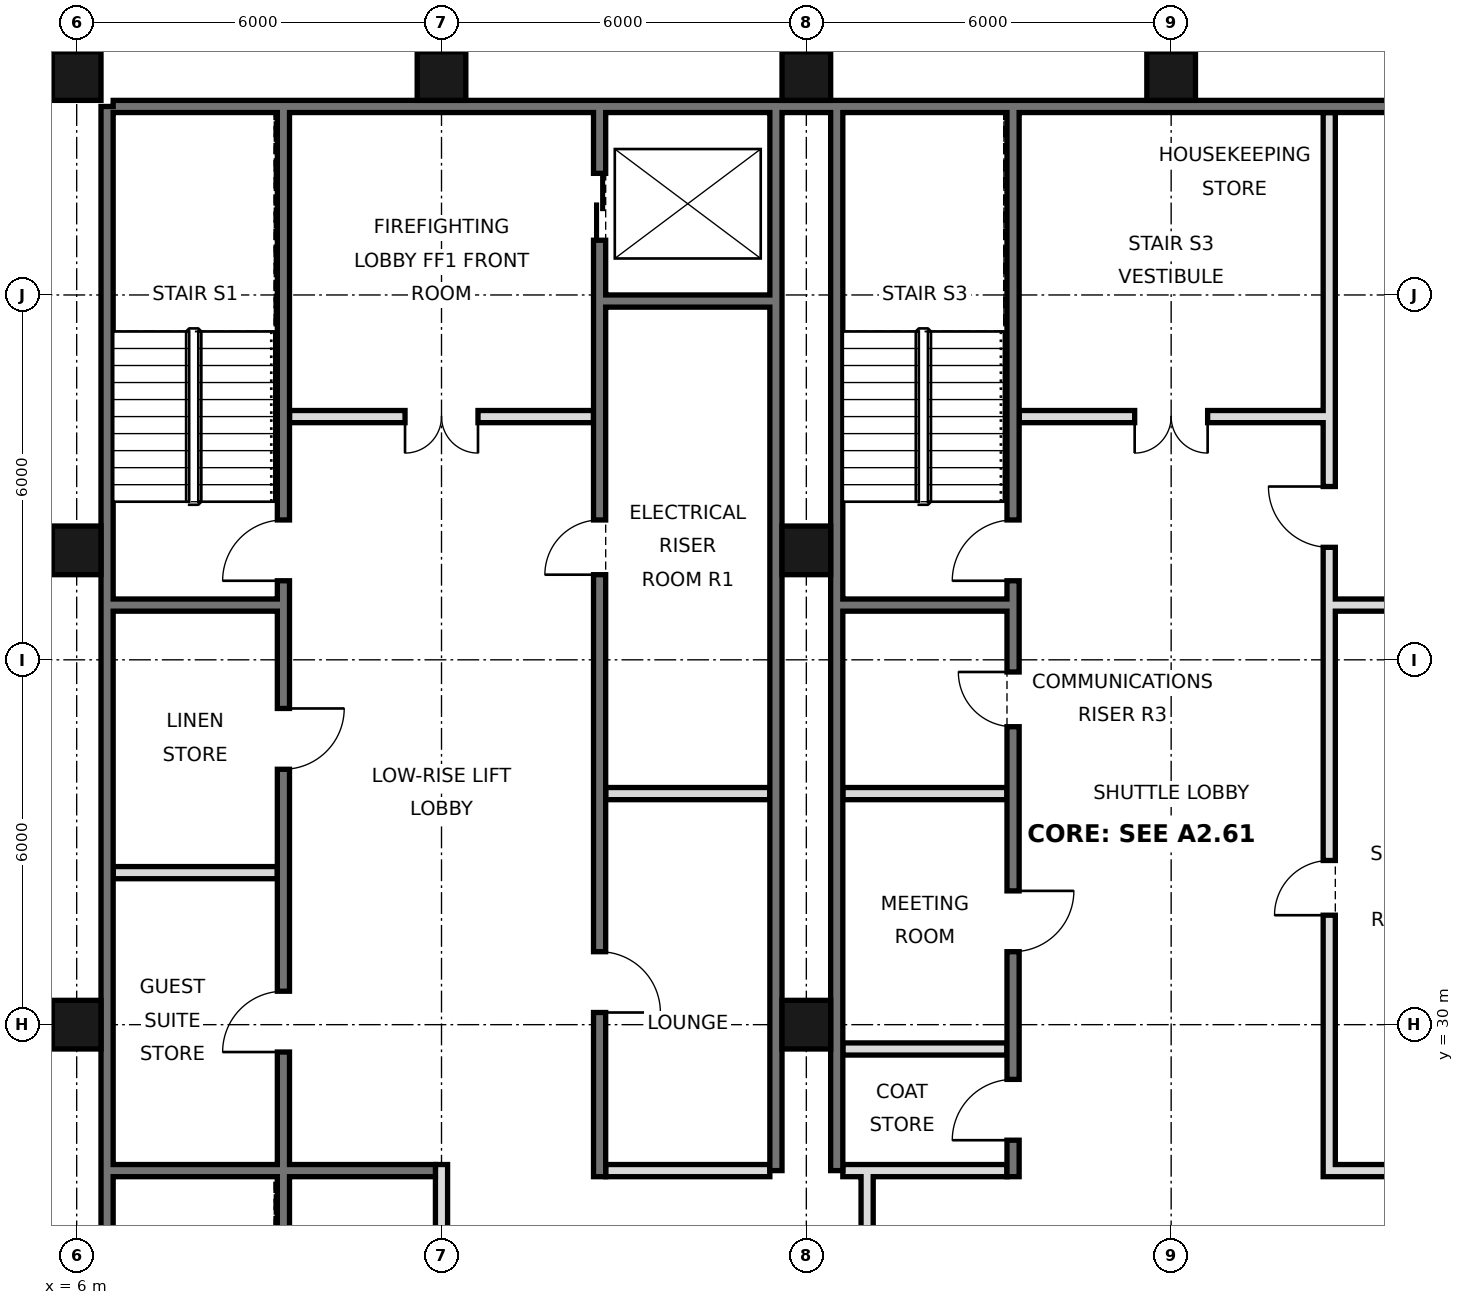
"""IFC4 building model, lengths in metres.
Left out: names, types, materials, properties, quantities, classifications, styles, units other than length and angle.
Written with IfcOpenShell. Run it as: python <this file> out.ifc"""

import sys

from ifc_helpers import new_model, si_unit, direction, frame, frame_2d, origin, origin_2d, place, context, subcontext, project, spatial, rectangle, hollow_rectangle, extrude, element, fill, save


model = new_model("IFC4")
c1 = context("Model", 3, precision=1e-05, world=origin(), true_north=direction((0.0, 1.0)))
c2 = subcontext(c1, "Body", "Model", "MODEL_VIEW")
j1 = project(units=[si_unit("LENGTHUNIT", "METRE"), si_unit("PLANEANGLEUNIT", "RADIAN")], contexts=[c1])
p1 = place(None, origin())
s1 = spatial("IfcSite", under=j1, at=p1, CompositionType="ELEMENT")
p2 = place(p1, origin())
s2 = spatial("IfcBuilding", under=s1, at=p2, CompositionType="ELEMENT")
p3 = place(p2, frame((0.0, 0.0, 243.2)))
s3 = spatial("IfcBuildingStorey", under=s2, at=p3, CompositionType="ELEMENT", Elevation=243.2)
for number, where, z_axis, x_axis in (
    (1, (6.0, 30.0, 0.0), (0.0, 0.0, 1.0), (1.0, 0.0, 0.0)),
    (2, (6.0, 37.8, 0.0), (0.0, 0.0, 1.0), (1.0, 0.0, 0.0)),
    (3, (6.0, 45.6, 0.0), (0.0, 0.0, 1.0), (1.0, 0.0, 0.0)),
    (4, (12.0, 45.6, 0.0), (0.0, 0.0, 1.0), (1.0, 0.0, 0.0)),
    (5, (18.0, 30.0, 0.0), (0.0, 0.0, 1.0), (1.0, 0.0, 0.0)),
    (6, (18.0, 37.8, 0.0), (0.0, 0.0, 1.0), (1.0, 0.0, 0.0)),
    (7, (18.0, 45.6, 0.0), (0.0, 0.0, 1.0), (1.0, 0.0, 0.0)),
    (8, (24.0, 45.6, 0.0), (0.0, 0.0, 1.0), (1.0, 0.0, 0.0)),
):
    element("IfcColumn", number, at=place(p3, frame(where, z_axis=z_axis, x_axis=x_axis)), inside=s3, PredefinedType="COLUMN", context=c2, shape_type="SweptSolid", body=[
        extrude(hollow_rectangle(XDim=0.8, YDim=0.8, WallThickness=0.04, at=origin_2d()), origin(), (0.0, 0.0, 1.0), 3.6),
    ])
p4 = place(p3, frame((6.5, 21.6, 0.0), z_axis=(0.0, 0.0, 1.0), x_axis=(0.0, 1.0, 0.0)))
e9 = element("IfcWall", 9, at=p4, inside=s3, PredefinedType="SOLIDWALL", context=c2, shape_type="SweptSolid", body=[
    extrude(rectangle(XDim=23.5, YDim=0.2, at=frame_2d((11.75, 0.0))), origin(), (0.0, 0.0, 1.0), 3.42),
])
p5 = place(p3, frame((6.6, 45.1, 0.0), z_axis=(0.0, 0.0, 1.0), x_axis=(1.0, 0.0, 0.0)))
e10 = element("IfcWall", 10, at=p5, inside=s3, PredefinedType="SOLIDWALL", context=c2, shape_type="SweptSolid", body=[
    extrude(rectangle(XDim=34.8, YDim=0.2, at=frame_2d((17.4, 0.0))), origin(), (0.0, 0.0, 1.0), 3.42),
])
for number, where, z_axis, x_axis in (
    (11, (17.5, 27.6, 0.0), (0.0, 0.0, 1.0), (0.0, 1.0, 0.0)),
    (12, (18.5, 27.6, 0.0), (0.0, 0.0, 1.0), (0.0, 1.0, 0.0)),
):
    element("IfcWall", number, at=place(p3, frame(where, z_axis=z_axis, x_axis=x_axis)), inside=s3, PredefinedType="SOLIDWALL", context=c2, shape_type="SweptSolid", body=[
        extrude(rectangle(XDim=17.5, YDim=0.2, at=frame_2d((8.75, 0.0))), origin(), (0.0, 0.0, 1.0), 3.42),
    ])
p6 = place(p3, frame((19.0, 21.6, 0.0), z_axis=(0.0, 0.0, 1.0), x_axis=(0.0, 1.0, 0.0)))
e13 = element("IfcWall", 13, at=p6, inside=s3, PredefinedType="PARTITIONING", context=c2, shape_type="SweptSolid", body=[
    extrude(rectangle(XDim=6.0, YDim=0.2, at=frame_2d((3.0, 0.0))), origin(), (0.0, 0.0, 1.0), 3.42),
])
p7 = place(p6, frame((2.1, 0.0, 0.0)))
e14 = element("IfcOpeningElement", 14, at=p7, cuts=e13, PredefinedType="OPENING", context=c2, shape_type="SweptSolid", body=[
    extrude(rectangle(XDim=1.8, YDim=2.1, at=frame_2d((0.9, 1.05))), frame((0.0, 0.11, 0.0), z_axis=(0.0, -1.0, 0.0), x_axis=(1.0, 0.0, 0.0)), (0.0, 0.0, 1.0), 0.22),
])
p8 = place(p3, frame((12.0, 21.6, 0.0), z_axis=(0.0, 0.0, 1.0), x_axis=(0.0, 1.0, 0.0)))
e15 = element("IfcWall", 15, at=p8, inside=s3, PredefinedType="PARTITIONING", context=c2, shape_type="SweptSolid", body=[
    extrude(rectangle(XDim=6.1, YDim=0.2, at=frame_2d((3.05, 0.0))), origin(), (0.0, 0.0, 1.0), 3.42),
])
p9 = place(p3, frame((14.6, 27.5, 0.0), z_axis=(0.0, 0.0, 1.0), x_axis=(0.0, 1.0, 0.0)))
e16 = element("IfcWall", 16, at=p9, inside=s3, PredefinedType="SOLIDWALL", context=c2, shape_type="SweptSolid", body=[
    extrude(rectangle(XDim=17.5, YDim=0.2, at=frame_2d((8.75, 0.0))), origin(), (0.0, 0.0, 1.0), 3.42),
])
p10 = place(p9, frame((15.4, 0.0, 0.0)))
e17 = element("IfcOpeningElement", 17, at=p10, cuts=e16, PredefinedType="OPENING", context=c2, shape_type="SweptSolid", body=[
    extrude(rectangle(XDim=1.1, YDim=2.1, at=frame_2d((0.55, 1.05))), frame((0.0, 0.11, 0.0), z_axis=(0.0, -1.0, 0.0), x_axis=(1.0, 0.0, 0.0)), (0.0, 0.0, 1.0), 0.22),
])
p11 = place(p9, frame((2.7, 0.0, 0.0)))
e18 = element("IfcOpeningElement", 18, at=p11, cuts=e16, PredefinedType="OPENING", context=c2, shape_type="SweptSolid", body=[
    extrude(rectangle(XDim=1.0, YDim=2.1, at=frame_2d((0.5, 1.05))), frame((0.0, 0.11, 0.0), z_axis=(0.0, -1.0, 0.0), x_axis=(1.0, 0.0, 0.0)), (0.0, 0.0, 1.0), 0.22),
])
p12 = place(p9, frame((9.9, 0.0, 0.0)))
e19 = element("IfcOpeningElement", 19, at=p12, cuts=e16, PredefinedType="OPENING", context=c2, shape_type="SweptSolid", body=[
    extrude(rectangle(XDim=0.9, YDim=2.1, at=frame_2d((0.45, 1.05))), frame((0.0, 0.11, 0.0), z_axis=(0.0, -1.0, 0.0), x_axis=(1.0, 0.0, 0.0)), (0.0, 0.0, 1.0), 0.22),
])
p13 = place(p3, frame((21.4, 27.5, 0.0), z_axis=(0.0, 0.0, 1.0), x_axis=(0.0, 1.0, 0.0)))
e20 = element("IfcWall", 20, at=p13, inside=s3, PredefinedType="SOLIDWALL", context=c2, shape_type="SweptSolid", body=[
    extrude(rectangle(XDim=17.5, YDim=0.2, at=frame_2d((8.75, 0.0))), origin(), (0.0, 0.0, 1.0), 3.42),
])
p14 = place(p13, frame((0.6, 0.0, 0.0)))
e21 = element("IfcOpeningElement", 21, at=p14, cuts=e20, PredefinedType="OPENING", context=c2, shape_type="SweptSolid", body=[
    extrude(rectangle(XDim=1.0, YDim=2.1, at=frame_2d((0.5, 1.05))), frame((0.0, 0.11, 0.0), z_axis=(0.0, -1.0, 0.0), x_axis=(1.0, 0.0, 0.0)), (0.0, 0.0, 1.0), 0.22),
])
p15 = place(p13, frame((3.7, 0.0, 0.0)))
e22 = element("IfcOpeningElement", 22, at=p15, cuts=e20, PredefinedType="OPENING", context=c2, shape_type="SweptSolid", body=[
    extrude(rectangle(XDim=1.0, YDim=2.1, at=frame_2d((0.5, 1.05))), frame((0.0, 0.11, 0.0), z_axis=(0.0, -1.0, 0.0), x_axis=(1.0, 0.0, 0.0)), (0.0, 0.0, 1.0), 0.22),
])
p16 = place(p13, frame((9.8, 0.0, 0.0)))
e23 = element("IfcOpeningElement", 23, at=p16, cuts=e20, PredefinedType="OPENING", context=c2, shape_type="SweptSolid", body=[
    extrude(rectangle(XDim=1.0, YDim=2.1, at=frame_2d((0.5, 1.05))), frame((0.0, 0.11, 0.0), z_axis=(0.0, -1.0, 0.0), x_axis=(1.0, 0.0, 0.0)), (0.0, 0.0, 1.0), 0.22),
])
p17 = place(p13, frame((7.4, 0.0, 0.0)))
e24 = element("IfcOpeningElement", 24, at=p17, cuts=e20, PredefinedType="OPENING", context=c2, shape_type="SweptSolid", body=[
    extrude(rectangle(XDim=0.9, YDim=2.1, at=frame_2d((0.45, 1.05))), frame((0.0, 0.11, 0.0), z_axis=(0.0, -1.0, 0.0), x_axis=(1.0, 0.0, 0.0)), (0.0, 0.0, 1.0), 0.22),
])
p18 = place(p3, frame((26.6, 27.5, 0.0), z_axis=(0.0, 0.0, 1.0), x_axis=(0.0, 1.0, 0.0)))
e25 = element("IfcWall", 25, at=p18, inside=s3, PredefinedType="SOLIDWALL", context=c2, shape_type="SweptSolid", body=[
    extrude(rectangle(XDim=17.5, YDim=0.2, at=frame_2d((8.75, 0.0))), origin(), (0.0, 0.0, 1.0), 3.42),
])
p19 = place(p18, frame((4.3, 0.0, 0.0)))
e26 = element("IfcOpeningElement", 26, at=p19, cuts=e25, PredefinedType="OPENING", context=c2, shape_type="SweptSolid", body=[
    extrude(rectangle(XDim=0.9, YDim=2.1, at=frame_2d((0.45, 1.05))), frame((0.0, 0.11, 0.0), z_axis=(0.0, -1.0, 0.0), x_axis=(1.0, 0.0, 0.0)), (0.0, 0.0, 1.0), 0.22),
])
p20 = place(p18, frame((10.35, 0.0, 0.0)))
e27 = element("IfcOpeningElement", 27, at=p20, cuts=e25, PredefinedType="OPENING", context=c2, shape_type="SweptSolid", body=[
    extrude(rectangle(XDim=1.0, YDim=2.1, at=frame_2d((0.5, 1.05))), frame((0.0, 0.11, 0.0), z_axis=(0.0, -1.0, 0.0), x_axis=(1.0, 0.0, 0.0)), (0.0, 0.0, 1.0), 0.22),
])
p21 = place(p3, frame((9.4, 21.6, 0.0), z_axis=(0.0, 0.0, 1.0), x_axis=(0.0, 1.0, 0.0)))
e28 = element("IfcWall", 28, at=p21, inside=s3, PredefinedType="SOLIDWALL", context=c2, shape_type="SweptSolid", body=[
    extrude(rectangle(XDim=23.4, YDim=0.2, at=frame_2d((11.7, 0.0))), origin(), (0.0, 0.0, 1.0), 3.42),
])
p22 = place(p21, frame((7.95, 0.0, 0.0)))
e29 = element("IfcOpeningElement", 29, at=p22, cuts=e28, PredefinedType="OPENING", context=c2, shape_type="SweptSolid", body=[
    extrude(rectangle(XDim=1.0, YDim=2.1, at=frame_2d((0.5, 1.05))), frame((0.0, 0.11, 0.0), z_axis=(0.0, -1.0, 0.0), x_axis=(1.0, 0.0, 0.0)), (0.0, 0.0, 1.0), 0.22),
])
p23 = place(p21, frame((12.6, 0.0, 0.0)))
e30 = element("IfcOpeningElement", 30, at=p23, cuts=e28, PredefinedType="OPENING", context=c2, shape_type="SweptSolid", body=[
    extrude(rectangle(XDim=1.0, YDim=2.1, at=frame_2d((0.5, 1.05))), frame((0.0, 0.11, 0.0), z_axis=(0.0, -1.0, 0.0), x_axis=(1.0, 0.0, 0.0)), (0.0, 0.0, 1.0), 0.22),
])
p24 = place(p21, frame((15.7, 0.0, 0.0)))
e31 = element("IfcOpeningElement", 31, at=p24, cuts=e28, PredefinedType="OPENING", context=c2, shape_type="SweptSolid", body=[
    extrude(rectangle(XDim=1.0, YDim=2.1, at=frame_2d((0.5, 1.05))), frame((0.0, 0.11, 0.0), z_axis=(0.0, -1.0, 0.0), x_axis=(1.0, 0.0, 0.0)), (0.0, 0.0, 1.0), 0.22),
])
p25 = place(p21, frame((0.175, 0.0, 0.0)))
e32 = element("IfcOpeningElement", 32, at=p25, cuts=e28, PredefinedType="OPENING", context=c2, shape_type="SweptSolid", body=[
    extrude(rectangle(XDim=0.9, YDim=2.1, at=frame_2d((0.45, 1.05))), frame((0.0, 0.11, 0.0), z_axis=(0.0, -1.0, 0.0), x_axis=(1.0, 0.0, 0.0)), (0.0, 0.0, 1.0), 0.22),
])
for number, where, z_axis, x_axis in (
    (33, (14.7, 27.6, 0.0), (0.0, 0.0, 1.0), (1.0, 0.0, 0.0)),
    (34, (18.6, 27.6, 0.0), (0.0, 0.0, 1.0), (1.0, 0.0, 0.0)),
):
    element("IfcWall", number, at=place(p3, frame(where, z_axis=z_axis, x_axis=x_axis)), inside=s3, PredefinedType="PARTITIONING", context=c2, shape_type="SweptSolid", body=[
        extrude(rectangle(XDim=2.7, YDim=0.2, at=frame_2d((1.35, 0.0))), origin(), (0.0, 0.0, 1.0), 3.42),
    ])
p26 = place(p3, frame((26.7, 27.6, 0.0), z_axis=(0.0, 0.0, 1.0), x_axis=(1.0, 0.0, 0.0)))
e35 = element("IfcWall", 35, at=p26, inside=s3, PredefinedType="SOLIDWALL", context=c2, shape_type="SweptSolid", body=[
    extrude(rectangle(XDim=2.7, YDim=0.2, at=frame_2d((1.35, 0.0))), origin(), (0.0, 0.0, 1.0), 3.42),
])
p27 = place(p3, frame((6.6, 27.6, 0.0), z_axis=(0.0, 0.0, 1.0), x_axis=(1.0, 0.0, 0.0)))
e36 = element("IfcWall", 36, at=p27, inside=s3, PredefinedType="SOLIDWALL", context=c2, shape_type="SweptSolid", body=[
    extrude(rectangle(XDim=5.3, YDim=0.2, at=frame_2d((2.65, 0.0))), origin(), (0.0, 0.0, 1.0), 3.42),
])
for number, where, z_axis, x_axis in (
    (37, (18.6, 29.6, 0.0), (0.0, 0.0, 1.0), (1.0, 0.0, 0.0)),
    (38, (6.6, 32.5, 0.0), (0.0, 0.0, 1.0), (1.0, 0.0, 0.0)),
):
    element("IfcWall", number, at=place(p3, frame(where, z_axis=z_axis, x_axis=x_axis)), inside=s3, PredefinedType="PARTITIONING", context=c2, shape_type="SweptSolid", body=[
        extrude(rectangle(XDim=2.7, YDim=0.2, at=frame_2d((1.35, 0.0))), origin(), (0.0, 0.0, 1.0), 3.42),
    ])
for number, where, z_axis, x_axis in (
    (39, (14.7, 33.8, 0.0), (0.0, 0.0, 1.0), (1.0, 0.0, 0.0)),
    (40, (18.6, 33.8, 0.0), (0.0, 0.0, 1.0), (1.0, 0.0, 0.0)),
    (41, (18.6, 36.9, 0.0), (0.0, 0.0, 1.0), (1.0, 0.0, 0.0)),
    (42, (26.7, 36.9, 0.0), (0.0, 0.0, 1.0), (1.0, 0.0, 0.0)),
    (43, (6.6, 36.9, 0.0), (0.0, 0.0, 1.0), (1.0, 0.0, 0.0)),
):
    element("IfcWall", number, at=place(p3, frame(where, z_axis=z_axis, x_axis=x_axis)), inside=s3, PredefinedType="SOLIDWALL", context=c2, shape_type="SweptSolid", body=[
        extrude(rectangle(XDim=2.7, YDim=0.2, at=frame_2d((1.35, 0.0))), origin(), (0.0, 0.0, 1.0), 3.42),
    ])
p28 = place(p3, frame((21.5, 40.0, 0.0), z_axis=(0.0, 0.0, 1.0), x_axis=(1.0, 0.0, 0.0)))
e44 = element("IfcWall", 44, at=p28, inside=s3, PredefinedType="PARTITIONING", context=c2, shape_type="SweptSolid", body=[
    extrude(rectangle(XDim=5.0, YDim=0.2, at=frame_2d((2.5, 0.0))), origin(), (0.0, 0.0, 1.0), 3.42),
])
p29 = place(p28, frame((1.9, 0.0, 0.0)))
e45 = element("IfcOpeningElement", 45, at=p29, cuts=e44, PredefinedType="OPENING", context=c2, shape_type="SweptSolid", body=[
    extrude(rectangle(XDim=1.2, YDim=2.1, at=frame_2d((0.6, 1.05))), frame((0.0, 0.11, 0.0), z_axis=(0.0, -1.0, 0.0), x_axis=(1.0, 0.0, 0.0)), (0.0, 0.0, 1.0), 0.22),
])
p30 = place(p3, frame((9.5, 40.0, 0.0), z_axis=(0.0, 0.0, 1.0), x_axis=(1.0, 0.0, 0.0)))
e46 = element("IfcWall", 46, at=p30, inside=s3, PredefinedType="PARTITIONING", context=c2, shape_type="SweptSolid", body=[
    extrude(rectangle(XDim=5.0, YDim=0.2, at=frame_2d((2.5, 0.0))), origin(), (0.0, 0.0, 1.0), 3.42),
])
p31 = place(p30, frame((1.9, 0.0, 0.0)))
e47 = element("IfcOpeningElement", 47, at=p31, cuts=e46, PredefinedType="OPENING", context=c2, shape_type="SweptSolid", body=[
    extrude(rectangle(XDim=1.2, YDim=2.1, at=frame_2d((0.6, 1.05))), frame((0.0, 0.11, 0.0), z_axis=(0.0, -1.0, 0.0), x_axis=(1.0, 0.0, 0.0)), (0.0, 0.0, 1.0), 0.22),
])
p32 = place(p3, frame((14.7, 41.9, 0.0), z_axis=(0.0, 0.0, 1.0), x_axis=(1.0, 0.0, 0.0)))
e48 = element("IfcWall", 48, at=p32, inside=s3, PredefinedType="SOLIDWALL", context=c2, shape_type="SweptSolid", body=[
    extrude(rectangle(XDim=2.7, YDim=0.2, at=frame_2d((1.35, 0.0))), origin(), (0.0, 0.0, 1.0), 3.42),
])
p33 = place(p31, frame((1.2, 0.0, 0.0), z_axis=(0.0, 0.0, 1.0), x_axis=(-1.0, 0.0, 0.0)))
e49 = element("IfcDoor", 49, at=p33, inside=s3, OperationType="DOUBLE_DOOR_SINGLE_SWING", PredefinedType="DOOR", context=c2, shape_type="SweptSolid", body=[
    extrude(rectangle(XDim=1.2, YDim=2.1, at=frame_2d((0.6, 1.05))), frame((0.0, 0.025, 0.0), z_axis=(0.0, -1.0, 0.0), x_axis=(1.0, 0.0, 0.0)), (0.0, 0.0, 1.0), 0.05),
])
fill(e47, e49)
p34 = place(p29, frame((1.2, 0.0, 0.0), z_axis=(0.0, 0.0, 1.0), x_axis=(-1.0, 0.0, 0.0)))
e50 = element("IfcDoor", 50, at=p34, inside=s3, OperationType="DOUBLE_DOOR_SINGLE_SWING", PredefinedType="DOOR", context=c2, shape_type="SweptSolid", body=[
    extrude(rectangle(XDim=1.2, YDim=2.1, at=frame_2d((0.6, 1.05))), frame((0.0, 0.025, 0.0), z_axis=(0.0, -1.0, 0.0), x_axis=(1.0, 0.0, 0.0)), (0.0, 0.0, 1.0), 0.05),
])
fill(e45, e50)
p35 = place(p10, origin())
e51 = element("IfcDoor", 51, at=p35, inside=s3, OperationType="DOUBLE_DOOR_SLIDING", PredefinedType="DOOR", context=c2, shape_type="SweptSolid", body=[
    extrude(rectangle(XDim=1.1, YDim=2.1, at=frame_2d((0.55, 1.05))), frame((0.0, 0.025, 0.0), z_axis=(0.0, -1.0, 0.0), x_axis=(1.0, 0.0, 0.0)), (0.0, 0.0, 1.0), 0.05),
])
fill(e17, e51)
p36 = place(p14, origin())
e52 = element("IfcDoor", 52, at=p36, inside=s3, OperationType="SINGLE_SWING_LEFT", PredefinedType="DOOR", context=c2, shape_type="SweptSolid", body=[
    extrude(rectangle(XDim=1.0, YDim=2.1, at=frame_2d((0.5, 1.05))), frame((0.0, 0.025, 0.0), z_axis=(0.0, -1.0, 0.0), x_axis=(1.0, 0.0, 0.0)), (0.0, 0.0, 1.0), 0.05),
])
fill(e21, e52)
p37 = place(p15, origin())
e53 = element("IfcDoor", 53, at=p37, inside=s3, OperationType="SINGLE_SWING_RIGHT", PredefinedType="DOOR", context=c2, shape_type="SweptSolid", body=[
    extrude(rectangle(XDim=1.0, YDim=2.1, at=frame_2d((0.5, 1.05))), frame((0.0, 0.025, 0.0), z_axis=(0.0, -1.0, 0.0), x_axis=(1.0, 0.0, 0.0)), (0.0, 0.0, 1.0), 0.05),
])
fill(e22, e53)
p38 = place(p11, frame((1.0, 0.0, 0.0), z_axis=(0.0, 0.0, 1.0), x_axis=(-1.0, 0.0, 0.0)))
e54 = element("IfcDoor", 54, at=p38, inside=s3, OperationType="SINGLE_SWING_RIGHT", PredefinedType="DOOR", context=c2, shape_type="SweptSolid", body=[
    extrude(rectangle(XDim=1.0, YDim=2.1, at=frame_2d((0.5, 1.05))), frame((0.0, 0.025, 0.0), z_axis=(0.0, -1.0, 0.0), x_axis=(1.0, 0.0, 0.0)), (0.0, 0.0, 1.0), 0.05),
])
fill(e18, e54)
p39 = place(p22, origin())
e55 = element("IfcDoor", 55, at=p39, inside=s3, OperationType="SINGLE_SWING_LEFT", PredefinedType="DOOR", context=c2, shape_type="SweptSolid", body=[
    extrude(rectangle(XDim=1.0, YDim=2.1, at=frame_2d((0.5, 1.05))), frame((0.0, 0.025, 0.0), z_axis=(0.0, -1.0, 0.0), x_axis=(1.0, 0.0, 0.0)), (0.0, 0.0, 1.0), 0.05),
])
fill(e29, e55)
p40 = place(p23, origin())
e56 = element("IfcDoor", 56, at=p40, inside=s3, OperationType="SINGLE_SWING_RIGHT", PredefinedType="DOOR", context=c2, shape_type="SweptSolid", body=[
    extrude(rectangle(XDim=1.0, YDim=2.1, at=frame_2d((0.5, 1.05))), frame((0.0, 0.025, 0.0), z_axis=(0.0, -1.0, 0.0), x_axis=(1.0, 0.0, 0.0)), (0.0, 0.0, 1.0), 0.05),
])
fill(e30, e56)
p41 = place(p24, origin())
e57 = element("IfcDoor", 57, at=p41, inside=s3, OperationType="SINGLE_SWING_LEFT", PredefinedType="DOOR", context=c2, shape_type="SweptSolid", body=[
    extrude(rectangle(XDim=1.0, YDim=2.1, at=frame_2d((0.5, 1.05))), frame((0.0, 0.025, 0.0), z_axis=(0.0, -1.0, 0.0), x_axis=(1.0, 0.0, 0.0)), (0.0, 0.0, 1.0), 0.05),
])
fill(e31, e57)
p42 = place(p16, origin())
e58 = element("IfcDoor", 58, at=p42, inside=s3, OperationType="SINGLE_SWING_LEFT", PredefinedType="DOOR", context=c2, shape_type="SweptSolid", body=[
    extrude(rectangle(XDim=1.0, YDim=2.1, at=frame_2d((0.5, 1.05))), frame((0.0, 0.025, 0.0), z_axis=(0.0, -1.0, 0.0), x_axis=(1.0, 0.0, 0.0)), (0.0, 0.0, 1.0), 0.05),
])
fill(e23, e58)
p43 = place(p12, origin())
e59 = element("IfcDoor", 59, at=p43, inside=s3, OperationType="SINGLE_SWING_LEFT", PredefinedType="DOOR", context=c2, shape_type="SweptSolid", body=[
    extrude(rectangle(XDim=0.9, YDim=2.1, at=frame_2d((0.45, 1.05))), frame((0.0, 0.025, 0.0), z_axis=(0.0, -1.0, 0.0), x_axis=(1.0, 0.0, 0.0)), (0.0, 0.0, 1.0), 0.05),
])
fill(e19, e59)
p44 = place(p17, frame((0.9, 0.0, 0.0), z_axis=(0.0, 0.0, 1.0), x_axis=(-1.0, 0.0, 0.0)))
e60 = element("IfcDoor", 60, at=p44, inside=s3, OperationType="SINGLE_SWING_LEFT", PredefinedType="DOOR", context=c2, shape_type="SweptSolid", body=[
    extrude(rectangle(XDim=0.9, YDim=2.1, at=frame_2d((0.45, 1.05))), frame((0.0, 0.025, 0.0), z_axis=(0.0, -1.0, 0.0), x_axis=(1.0, 0.0, 0.0)), (0.0, 0.0, 1.0), 0.05),
])
fill(e24, e60)
p45 = place(p19, origin())
e61 = element("IfcDoor", 61, at=p45, inside=s3, OperationType="SINGLE_SWING_LEFT", PredefinedType="DOOR", context=c2, shape_type="SweptSolid", body=[
    extrude(rectangle(XDim=0.9, YDim=2.1, at=frame_2d((0.45, 1.05))), frame((0.0, 0.025, 0.0), z_axis=(0.0, -1.0, 0.0), x_axis=(1.0, 0.0, 0.0)), (0.0, 0.0, 1.0), 0.05),
])
fill(e26, e61)
p46 = place(p20, frame((1.0, 0.0, 0.0), z_axis=(0.0, 0.0, 1.0), x_axis=(-1.0, 0.0, 0.0)))
e62 = element("IfcDoor", 62, at=p46, inside=s3, OperationType="SINGLE_SWING_LEFT", PredefinedType="DOOR", context=c2, shape_type="SweptSolid", body=[
    extrude(rectangle(XDim=1.0, YDim=2.1, at=frame_2d((0.5, 1.05))), frame((0.0, 0.025, 0.0), z_axis=(0.0, -1.0, 0.0), x_axis=(1.0, 0.0, 0.0)), (0.0, 0.0, 1.0), 0.05),
])
fill(e27, e62)
save(model, sys.argv[1])
